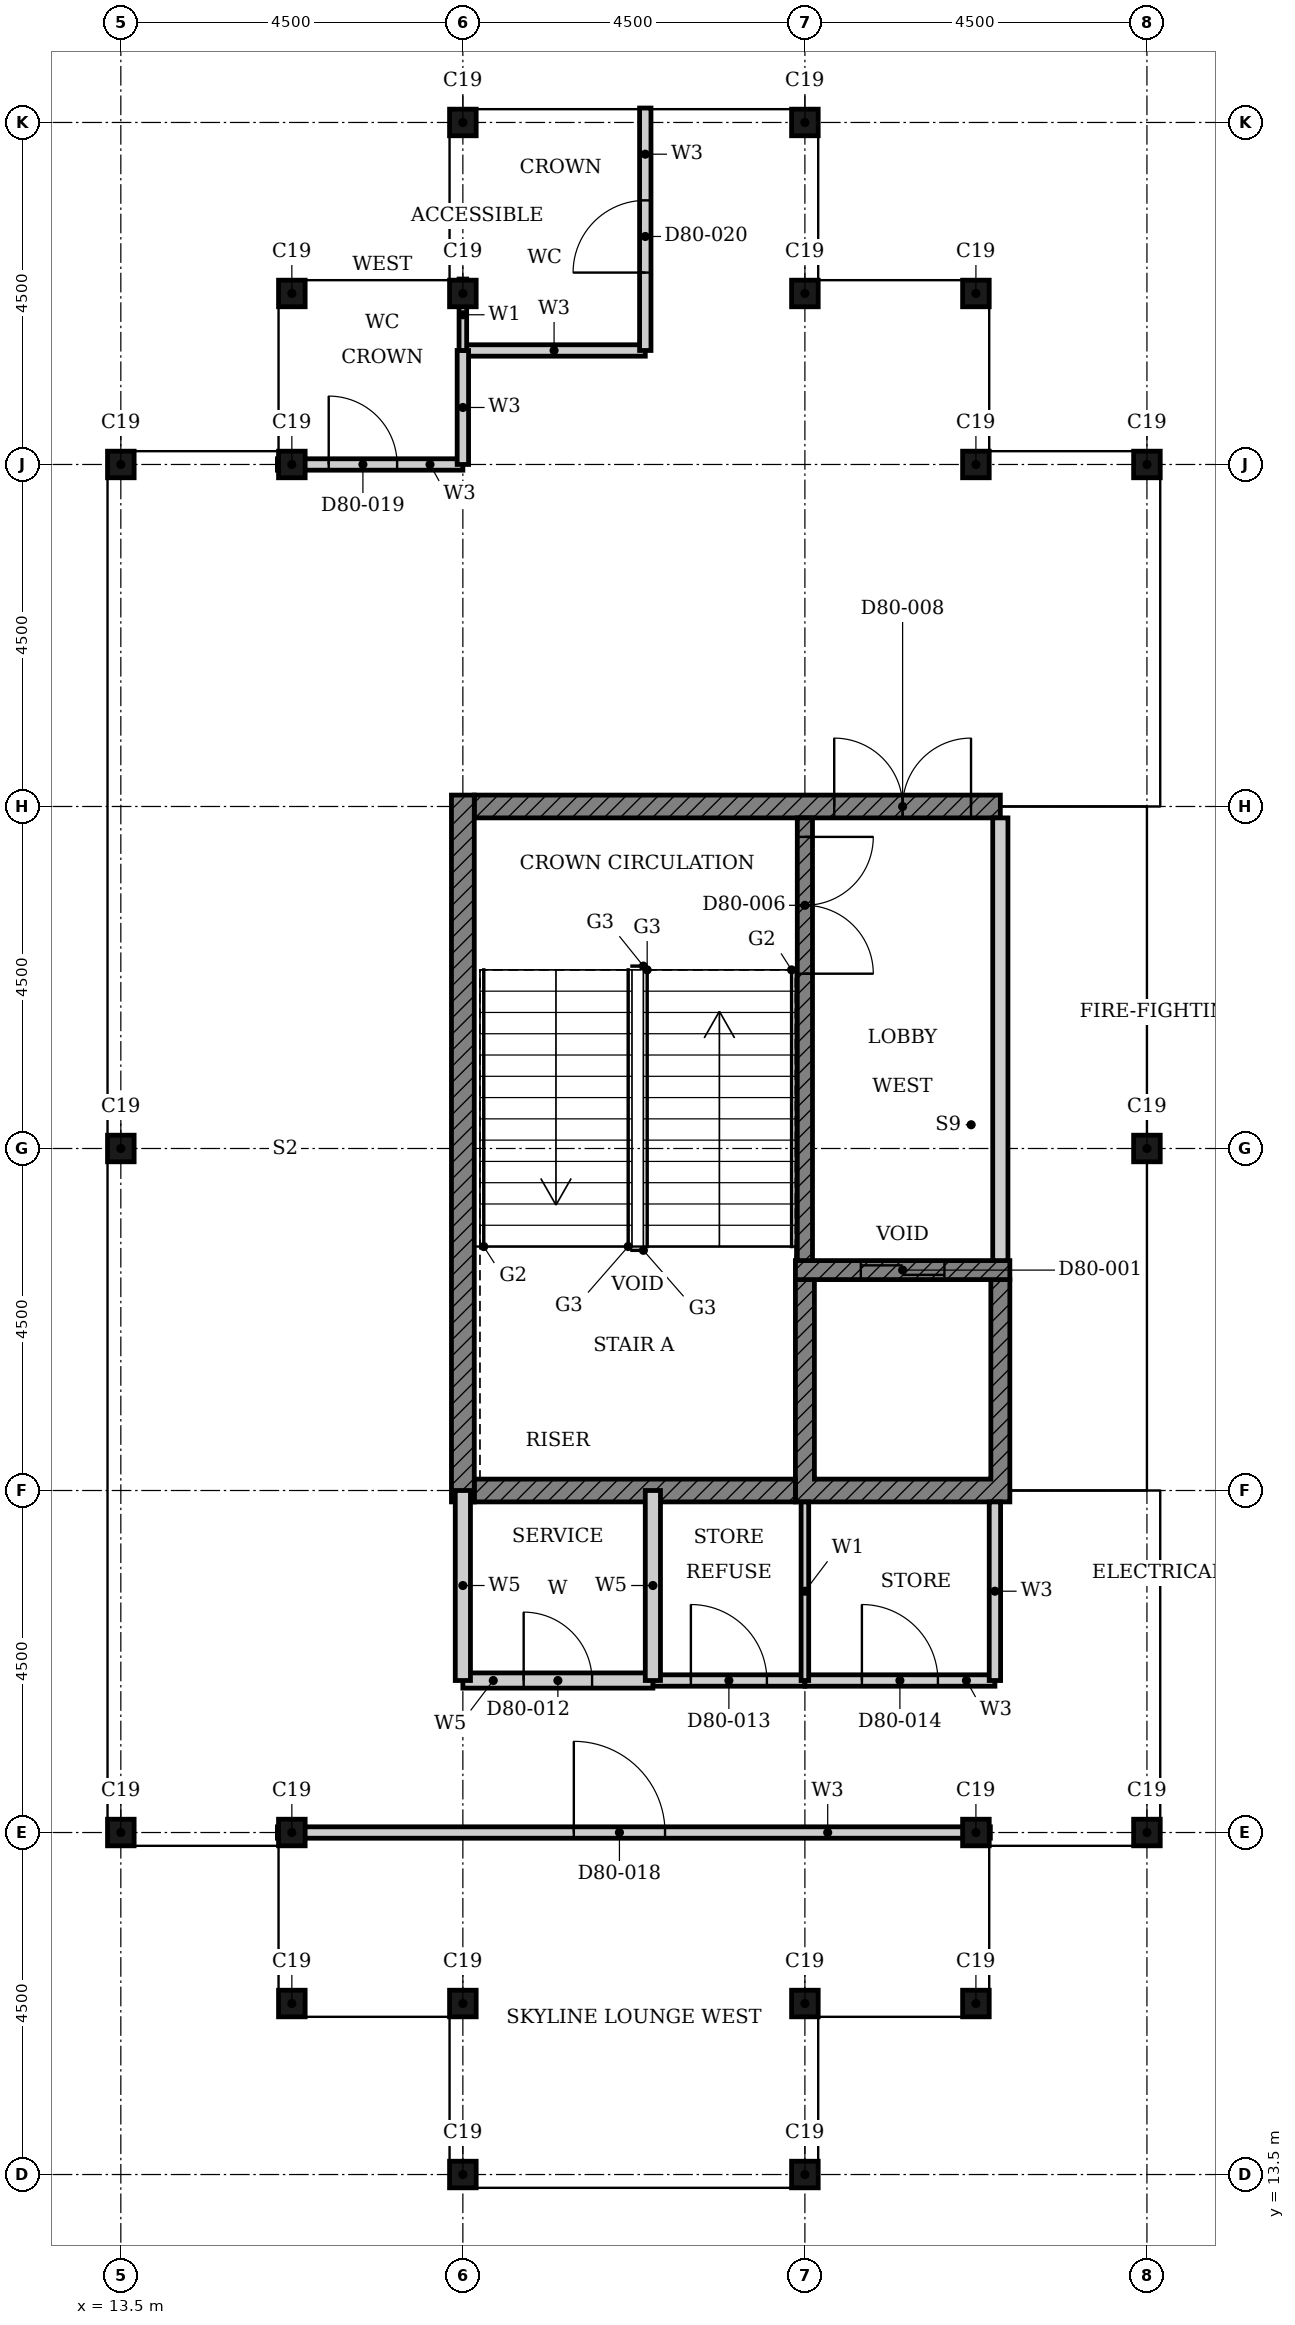
"""IFC4 building model, lengths in metres.
Left out: names, types, materials, properties, quantities, classifications, styles, units other than length and angle.
Written with IfcOpenShell. Run it as: python <this file> out.ifc"""

import sys

from ifc_helpers import new_model, si_unit, direction, frame, frame_2d, origin, origin_2d, place, context, subcontext, project, spatial, polyline, rectangle, i_section, outline, extrude, element, fill, save


model = new_model("IFC4")
c1 = context("Model", 3, precision=1e-05, world=origin(), true_north=direction((0.0, 1.0)))
c2 = subcontext(c1, "Body", "Model", "MODEL_VIEW")
j1 = project(units=[si_unit("LENGTHUNIT", "METRE"), si_unit("PLANEANGLEUNIT", "RADIAN")], contexts=[c1])
p1 = place(None, origin())
s1 = spatial("IfcSite", under=j1, at=p1, CompositionType="ELEMENT")
p2 = place(p1, origin())
s2 = spatial("IfcBuilding", under=s1, at=p2, CompositionType="ELEMENT")
p3 = place(p2, frame((0.0, 0.0, 317.0)))
s3 = spatial("IfcBuildingStorey", under=s2, at=p3, CompositionType="ELEMENT", Elevation=317.0)
for number, where, z_axis, x_axis in (
    (1, (22.5, 13.5, 0.0), (0.0, 0.0, 1.0), (1.0, 0.0, 0.0)),
    (2, (22.5, 15.75, 0.0), (0.0, 0.0, 1.0), (1.0, 0.0, 0.0)),
    (3, (24.75, 15.75, 0.0), (0.0, 0.0, 1.0), (1.0, 0.0, 0.0)),
    (4, (24.75, 18.0, 0.0), (0.0, 0.0, 1.0), (1.0, 0.0, 0.0)),
    (5, (27.0, 18.0, 0.0), (0.0, 0.0, 1.0), (1.0, 0.0, 0.0)),
    (6, (27.0, 27.0, 0.0), (0.0, 0.0, 1.0), (1.0, 0.0, 0.0)),
    (7, (27.0, 36.0, 0.0), (0.0, 0.0, 1.0), (1.0, 0.0, 0.0)),
    (8, (24.75, 36.0, 0.0), (0.0, 0.0, 1.0), (1.0, 0.0, 0.0)),
    (9, (24.75, 38.25, 0.0), (0.0, 0.0, 1.0), (1.0, 0.0, 0.0)),
    (10, (22.5, 38.25, 0.0), (0.0, 0.0, 1.0), (1.0, 0.0, 0.0)),
    (11, (22.5, 40.5, 0.0), (0.0, 0.0, 1.0), (1.0, 0.0, 0.0)),
    (12, (18.0, 40.5, 0.0), (0.0, 0.0, 1.0), (1.0, 0.0, 0.0)),
    (13, (18.0, 38.25, 0.0), (0.0, 0.0, 1.0), (1.0, 0.0, 0.0)),
    (14, (15.75, 38.25, 0.0), (0.0, 0.0, 1.0), (1.0, 0.0, 0.0)),
    (15, (15.75, 36.0, 0.0), (0.0, 0.0, 1.0), (1.0, 0.0, 0.0)),
    (16, (13.5, 36.0, 0.0), (0.0, 0.0, 1.0), (1.0, 0.0, 0.0)),
    (17, (13.5, 27.0, 0.0), (0.0, 0.0, 1.0), (1.0, 0.0, 0.0)),
    (18, (13.5, 18.0, 0.0), (0.0, 0.0, 1.0), (1.0, 0.0, 0.0)),
    (19, (15.75, 18.0, 0.0), (0.0, 0.0, 1.0), (1.0, 0.0, 0.0)),
    (20, (15.75, 15.75, 0.0), (0.0, 0.0, 1.0), (1.0, 0.0, 0.0)),
    (21, (18.0, 15.75, 0.0), (0.0, 0.0, 1.0), (1.0, 0.0, 0.0)),
    (22, (18.0, 13.5, 0.0), (0.0, 0.0, 1.0), (1.0, 0.0, 0.0)),
):
    element("IfcColumn", number, at=place(p3, frame(where, z_axis=z_axis, x_axis=x_axis)), inside=s3, PredefinedType="COLUMN", context=c2, shape_type="SweptSolid", body=[
        extrude(i_section(OverallWidth=0.35, OverallDepth=0.35, WebThickness=0.012, FlangeThickness=0.019, FilletRadius=0.013, at=origin_2d()), origin(), (0.0, 0.0, 1.0), 4.2),
    ])
p4 = place(p3, origin())
e23 = element("IfcWall", 23, at=p4, inside=s3, PredefinedType="SHEAR", context=c2, shape_type="SweptSolid", body=[
    extrude(outline(polyline([(22.375, 22.35), (25.197, 22.35), (25.197, 25.275), (24.947, 25.275), (24.947, 22.65), (22.625, 22.65), (22.625, 25.275), (22.375, 25.275), (22.375, 22.35)])), origin(), (0.0, 0.0, 1.0), 3.9),
])
p5 = place(p3, frame((18.15, 22.5, 0.0), z_axis=(0.0, 0.0, 1.0), x_axis=(1.0, 0.0, 0.0)))
e24 = element("IfcWall", 24, at=p5, inside=s3, PredefinedType="SHEAR", context=c2, shape_type="SweptSolid", body=[
    extrude(rectangle(XDim=4.225, YDim=0.3, at=frame_2d((2.113, 0.0))), origin(), (0.0, 0.0, 1.0), 3.2),
])
p6 = place(p3, frame((18.15, 31.5, 0.0), z_axis=(0.0, 0.0, 1.0), x_axis=(1.0, 0.0, 0.0)))
e25 = element("IfcWall", 25, at=p6, inside=s3, PredefinedType="SHEAR", context=c2, shape_type="SweptSolid", body=[
    extrude(rectangle(XDim=6.922, YDim=0.3, at=frame_2d((3.461, 0.0))), origin(), (0.0, 0.0, 1.0), 3.2),
])
p7 = place(p6, frame((4.736, 0.0, 0.0)))
e26 = element("IfcOpeningElement", 26, at=p7, cuts=e25, PredefinedType="OPENING", context=c2, shape_type="SweptSolid", body=[
    extrude(rectangle(XDim=1.8, YDim=2.1, at=frame_2d((0.9, 1.05))), frame((0.0, 0.16, 0.0), z_axis=(0.0, -1.0, 0.0), x_axis=(1.0, 0.0, 0.0)), (0.0, 0.0, 1.0), 0.32),
])
p8 = place(p3, frame((18.0, 22.35, 0.0), z_axis=(0.0, 0.0, 1.0), x_axis=(0.0, 1.0, 0.0)))
e27 = element("IfcWall", 27, at=p8, inside=s3, PredefinedType="SHEAR", context=c2, shape_type="SweptSolid", body=[
    extrude(rectangle(XDim=9.3, YDim=0.3, at=frame_2d((4.65, 0.0))), origin(), (0.0, 0.0, 1.0), 3.9),
])
p9 = place(p3, frame((22.375, 25.4, 0.0), z_axis=(0.0, 0.0, 1.0), x_axis=(1.0, 0.0, 0.0)))
e28 = element("IfcWall", 28, at=p9, inside=s3, PredefinedType="SHEAR", context=c2, shape_type="SweptSolid", body=[
    extrude(rectangle(XDim=2.822, YDim=0.25, at=frame_2d((1.411, 0.0))), origin(), (0.0, 0.0, 1.0), 3.9),
])
p10 = place(p9, frame((0.861, 0.0, 0.0)))
e29 = element("IfcOpeningElement", 29, at=p10, cuts=e28, PredefinedType="OPENING", context=c2, shape_type="SweptSolid", body=[
    extrude(rectangle(XDim=1.1, YDim=2.1, at=frame_2d((0.55, 1.05))), frame((0.0, 0.135, 0.0), z_axis=(0.0, -1.0, 0.0), x_axis=(1.0, 0.0, 0.0)), (0.0, 0.0, 1.0), 0.27),
])
p11 = place(p3, frame((22.5, 31.35, 0.0), z_axis=(0.0, 0.0, 1.0), x_axis=(0.0, -1.0, 0.0)))
e30 = element("IfcWall", 30, at=p11, inside=s3, PredefinedType="SHEAR", context=c2, shape_type="SweptSolid", body=[
    extrude(rectangle(XDim=5.825, YDim=0.2, at=frame_2d((2.913, 0.0))), origin(), (0.0, 0.0, 1.0), 3.9),
])
p12 = place(p11, frame((0.25, 0.0, 0.0)))
e31 = element("IfcOpeningElement", 31, at=p12, cuts=e30, PredefinedType="OPENING", context=c2, shape_type="SweptSolid", body=[
    extrude(rectangle(XDim=1.8, YDim=2.1, at=frame_2d((0.9, 1.05))), frame((0.0, 0.11, 0.0), z_axis=(0.0, -1.0, 0.0), x_axis=(1.0, 0.0, 0.0)), (0.0, 0.0, 1.0), 0.22),
])
p13 = place(p3, frame((25.072, 25.525, 0.0), z_axis=(0.0, 0.0, 1.0), x_axis=(0.0, 1.0, 0.0)))
e32 = element("IfcWall", 32, at=p13, inside=s3, PredefinedType="PARTITIONING", context=c2, shape_type="SweptSolid", body=[
    extrude(rectangle(XDim=5.825, YDim=0.2, at=frame_2d((2.913, 0.0))), origin(), (0.0, 0.0, 1.0), 3.9),
])
p14 = place(p3, frame((15.56, 18.0, 0.0), z_axis=(0.0, 0.0, 1.0), x_axis=(1.0, 0.0, 0.0)))
e33 = element("IfcWall", 33, at=p14, inside=s3, PredefinedType="PARTITIONING", context=c2, shape_type="SweptSolid", body=[
    extrude(rectangle(XDim=9.38, YDim=0.15, at=frame_2d((4.69, 0.0))), origin(), (0.0, 0.0, 1.0), 3.18),
])
p15 = place(p14, frame((3.9, 0.0, 0.0)))
e34 = element("IfcOpeningElement", 34, at=p15, cuts=e33, PredefinedType="OPENING", context=c2, shape_type="SweptSolid", body=[
    extrude(rectangle(XDim=1.2, YDim=2.4, at=frame_2d((0.6, 1.2))), frame((0.0, 0.085, 0.0), z_axis=(0.0, -1.0, 0.0), x_axis=(1.0, 0.0, 0.0)), (0.0, 0.0, 1.0), 0.17),
])
p16 = place(p3, frame((20.5, 20.0, 0.0), z_axis=(0.0, 0.0, 1.0), x_axis=(1.0, 0.0, 0.0)))
e35 = element("IfcWall", 35, at=p16, inside=s3, PredefinedType="PARTITIONING", context=c2, shape_type="SweptSolid", body=[
    extrude(rectangle(XDim=2.0, YDim=0.15, at=frame_2d((1.0, 0.0))), origin(), (0.0, 0.0, 1.0), 3.9),
])
p17 = place(p16, frame((0.5, 0.0, 0.0)))
e36 = element("IfcOpeningElement", 36, at=p17, cuts=e35, PredefinedType="OPENING", context=c2, shape_type="SweptSolid", body=[
    extrude(rectangle(XDim=1.0, YDim=2.1, at=frame_2d((0.5, 1.05))), frame((0.0, 0.085, 0.0), z_axis=(0.0, -1.0, 0.0), x_axis=(1.0, 0.0, 0.0)), (0.0, 0.0, 1.0), 0.17),
])
p18 = place(p3, frame((22.5, 20.0, 0.0), z_axis=(0.0, 0.0, 1.0), x_axis=(1.0, 0.0, 0.0)))
e37 = element("IfcWall", 37, at=p18, inside=s3, PredefinedType="PARTITIONING", context=c2, shape_type="SweptSolid", body=[
    extrude(rectangle(XDim=2.5, YDim=0.15, at=frame_2d((1.25, 0.0))), origin(), (0.0, 0.0, 1.0), 3.9),
])
p19 = place(p18, frame((0.75, 0.0, 0.0)))
e38 = element("IfcOpeningElement", 38, at=p19, cuts=e37, PredefinedType="OPENING", context=c2, shape_type="SweptSolid", body=[
    extrude(rectangle(XDim=1.0, YDim=2.1, at=frame_2d((0.5, 1.05))), frame((0.0, 0.085, 0.0), z_axis=(0.0, -1.0, 0.0), x_axis=(1.0, 0.0, 0.0)), (0.0, 0.0, 1.0), 0.17),
])
p20 = place(p3, frame((15.56, 36.0, 0.0), z_axis=(0.0, 0.0, 1.0), x_axis=(1.0, 0.0, 0.0)))
e39 = element("IfcWall", 39, at=p20, inside=s3, PredefinedType="PARTITIONING", context=c2, shape_type="SweptSolid", body=[
    extrude(rectangle(XDim=2.44, YDim=0.15, at=frame_2d((1.22, 0.0))), origin(), (0.0, 0.0, 1.0), 3.18),
])
p21 = place(p20, frame((0.675, 0.0, 0.0)))
e40 = element("IfcOpeningElement", 40, at=p21, cuts=e39, PredefinedType="OPENING", context=c2, shape_type="SweptSolid", body=[
    extrude(rectangle(XDim=0.9, YDim=2.1, at=frame_2d((0.45, 1.05))), frame((0.0, 0.085, 0.0), z_axis=(0.0, -1.0, 0.0), x_axis=(1.0, 0.0, 0.0)), (0.0, 0.0, 1.0), 0.17),
])
p22 = place(p3, frame((18.0, 37.5, 0.0), z_axis=(0.0, 0.0, 1.0), x_axis=(1.0, 0.0, 0.0)))
e41 = element("IfcWall", 41, at=p22, inside=s3, PredefinedType="PARTITIONING", context=c2, shape_type="SweptSolid", body=[
    extrude(rectangle(XDim=2.4, YDim=0.15, at=frame_2d((1.2, 0.0))), origin(), (0.0, 0.0, 1.0), 3.9),
])
p23 = place(p3, frame((18.0, 36.0, 0.0), z_axis=(0.0, 0.0, 1.0), x_axis=(0.0, 1.0, 0.0)))
e42 = element("IfcWall", 42, at=p23, inside=s3, PredefinedType="PARTITIONING", context=c2, shape_type="SweptSolid", body=[
    extrude(rectangle(XDim=1.5, YDim=0.15, at=frame_2d((0.75, 0.0))), origin(), (0.0, 0.0, 1.0), 3.9),
])
p24 = place(p3, frame((20.4, 37.5, 0.0), z_axis=(0.0, 0.0, 1.0), x_axis=(0.0, 1.0, 0.0)))
e43 = element("IfcWall", 43, at=p24, inside=s3, PredefinedType="PARTITIONING", context=c2, shape_type="SweptSolid", body=[
    extrude(rectangle(XDim=3.19, YDim=0.15, at=frame_2d((1.595, 0.0))), origin(), (0.0, 0.0, 1.0), 3.9),
])
p25 = place(p24, frame((1.025, 0.0, 0.0)))
e44 = element("IfcOpeningElement", 44, at=p25, cuts=e43, PredefinedType="OPENING", context=c2, shape_type="SweptSolid", body=[
    extrude(rectangle(XDim=0.95, YDim=2.1, at=frame_2d((0.475, 1.05))), frame((0.0, 0.085, 0.0), z_axis=(0.0, -1.0, 0.0), x_axis=(1.0, 0.0, 0.0)), (0.0, 0.0, 1.0), 0.17),
])
p26 = place(p3, frame((25.0, 20.0, 0.0), z_axis=(0.0, 0.0, 1.0), x_axis=(0.0, 1.0, 0.0)))
e45 = element("IfcWall", 45, at=p26, inside=s3, PredefinedType="PARTITIONING", context=c2, shape_type="SweptSolid", body=[
    extrude(rectangle(XDim=2.35, YDim=0.15, at=frame_2d((1.175, 0.0))), origin(), (0.0, 0.0, 1.0), 3.9),
])
p27 = place(p3, frame((18.0, 37.5, 0.0), z_axis=(0.0, 0.0, 1.0), x_axis=(0.0, 1.0, 0.0)))
e46 = element("IfcWall", 46, at=p27, inside=s3, PredefinedType="PARTITIONING", context=c2, shape_type="SweptSolid", body=[
    extrude(rectangle(XDim=0.94, YDim=0.1, at=frame_2d((0.47, 0.0))), origin(), (0.0, 0.0, 1.0), 3.9),
])
p28 = place(p3, frame((22.5, 20.0, 0.0), z_axis=(0.0, 0.0, 1.0), x_axis=(0.0, 1.0, 0.0)))
e47 = element("IfcWall", 47, at=p28, inside=s3, PredefinedType="PARTITIONING", context=c2, shape_type="SweptSolid", body=[
    extrude(rectangle(XDim=2.35, YDim=0.1, at=frame_2d((1.175, 0.0))), origin(), (0.0, 0.0, 1.0), 3.9),
])
p29 = place(p3, frame((18.0, 20.0, 0.0), z_axis=(0.0, 0.0, 1.0), x_axis=(1.0, 0.0, 0.0)))
e48 = element("IfcWall", 48, at=p29, inside=s3, PredefinedType="PARTITIONING", context=c2, shape_type="SweptSolid", body=[
    extrude(rectangle(XDim=2.5, YDim=0.2, at=frame_2d((1.25, 0.0))), origin(), (0.0, 0.0, 1.0), 3.9),
])
p30 = place(p29, frame((0.8, 0.0, 0.0)))
e49 = element("IfcOpeningElement", 49, at=p30, cuts=e48, PredefinedType="OPENING", context=c2, shape_type="SweptSolid", body=[
    extrude(rectangle(XDim=0.9, YDim=2.1, at=frame_2d((0.45, 1.05))), frame((0.0, 0.11, 0.0), z_axis=(0.0, -1.0, 0.0), x_axis=(1.0, 0.0, 0.0)), (0.0, 0.0, 1.0), 0.22),
])
for number, where, z_axis, x_axis in (
    (50, (18.0, 20.0, 0.0), (0.0, 0.0, 1.0), (0.0, 1.0, 0.0)),
    (51, (20.5, 20.0, 0.0), (0.0, 0.0, 1.0), (0.0, 1.0, 0.0)),
):
    element("IfcWall", number, at=place(p3, frame(where, z_axis=z_axis, x_axis=x_axis)), inside=s3, PredefinedType="PARTITIONING", context=c2, shape_type="SweptSolid", body=[
        extrude(rectangle(XDim=2.5, YDim=0.2, at=frame_2d((1.25, 0.0))), origin(), (0.0, 0.0, 1.0), 3.9),
    ])
p31 = place(p10, origin())
e52 = element("IfcDoor", 52, at=p31, inside=s3, OperationType="DOUBLE_DOOR_SLIDING", PredefinedType="DOOR", context=c2, shape_type="SweptSolid", body=[
    extrude(rectangle(XDim=1.1, YDim=2.1, at=frame_2d((0.55, 1.05))), frame((0.0, 0.025, 0.0), z_axis=(0.0, -1.0, 0.0), x_axis=(1.0, 0.0, 0.0)), (0.0, 0.0, 1.0), 0.05),
])
fill(e29, e52)
p32 = place(p12, origin())
e53 = element("IfcDoor", 53, at=p32, inside=s3, OperationType="DOUBLE_DOOR_SINGLE_SWING", PredefinedType="DOOR", context=c2, shape_type="SweptSolid", body=[
    extrude(rectangle(XDim=1.8, YDim=2.1, at=frame_2d((0.9, 1.05))), frame((0.0, 0.025, 0.0), z_axis=(0.0, -1.0, 0.0), x_axis=(1.0, 0.0, 0.0)), (0.0, 0.0, 1.0), 0.05),
])
fill(e31, e53)
p33 = place(p7, origin())
e54 = element("IfcDoor", 54, at=p33, inside=s3, OperationType="DOUBLE_DOOR_SINGLE_SWING", PredefinedType="DOOR", context=c2, shape_type="SweptSolid", body=[
    extrude(rectangle(XDim=1.8, YDim=2.1, at=frame_2d((0.9, 1.05))), frame((0.0, 0.025, 0.0), z_axis=(0.0, -1.0, 0.0), x_axis=(1.0, 0.0, 0.0)), (0.0, 0.0, 1.0), 0.05),
])
fill(e26, e54)
p34 = place(p30, origin())
e55 = element("IfcDoor", 55, at=p34, inside=s3, OperationType="SINGLE_SWING_RIGHT", PredefinedType="DOOR", context=c2, shape_type="SweptSolid", body=[
    extrude(rectangle(XDim=0.9, YDim=2.1, at=frame_2d((0.45, 1.05))), frame((0.0, 0.025, 0.0), z_axis=(0.0, -1.0, 0.0), x_axis=(1.0, 0.0, 0.0)), (0.0, 0.0, 1.0), 0.05),
])
fill(e49, e55)
p35 = place(p17, origin())
e56 = element("IfcDoor", 56, at=p35, inside=s3, OperationType="SINGLE_SWING_LEFT", PredefinedType="DOOR", context=c2, shape_type="SweptSolid", body=[
    extrude(rectangle(XDim=1.0, YDim=2.1, at=frame_2d((0.5, 1.05))), frame((0.0, 0.025, 0.0), z_axis=(0.0, -1.0, 0.0), x_axis=(1.0, 0.0, 0.0)), (0.0, 0.0, 1.0), 0.05),
])
fill(e36, e56)
p36 = place(p19, origin())
e57 = element("IfcDoor", 57, at=p36, inside=s3, OperationType="SINGLE_SWING_RIGHT", PredefinedType="DOOR", context=c2, shape_type="SweptSolid", body=[
    extrude(rectangle(XDim=1.0, YDim=2.1, at=frame_2d((0.5, 1.05))), frame((0.0, 0.025, 0.0), z_axis=(0.0, -1.0, 0.0), x_axis=(1.0, 0.0, 0.0)), (0.0, 0.0, 1.0), 0.05),
])
fill(e38, e57)
p37 = place(p15, origin())
e58 = element("IfcDoor", 58, at=p37, inside=s3, OperationType="SINGLE_SWING_RIGHT", PredefinedType="DOOR", context=c2, shape_type="SweptSolid", body=[
    extrude(rectangle(XDim=1.2, YDim=2.4, at=frame_2d((0.6, 1.2))), frame((0.0, 0.025, 0.0), z_axis=(0.0, -1.0, 0.0), x_axis=(1.0, 0.0, 0.0)), (0.0, 0.0, 1.0), 0.05),
])
fill(e34, e58)
p38 = place(p21, origin())
e59 = element("IfcDoor", 59, at=p38, inside=s3, OperationType="SINGLE_SWING_RIGHT", PredefinedType="DOOR", context=c2, shape_type="SweptSolid", body=[
    extrude(rectangle(XDim=0.9, YDim=2.1, at=frame_2d((0.45, 1.05))), frame((0.0, 0.025, 0.0), z_axis=(0.0, -1.0, 0.0), x_axis=(1.0, 0.0, 0.0)), (0.0, 0.0, 1.0), 0.05),
])
fill(e40, e59)
p39 = place(p25, origin())
e60 = element("IfcDoor", 60, at=p39, inside=s3, OperationType="SINGLE_SWING_LEFT", PredefinedType="DOOR", context=c2, shape_type="SweptSolid", body=[
    extrude(rectangle(XDim=0.95, YDim=2.1, at=frame_2d((0.475, 1.05))), frame((0.0, 0.025, 0.0), z_axis=(0.0, -1.0, 0.0), x_axis=(1.0, 0.0, 0.0)), (0.0, 0.0, 1.0), 0.05),
])
fill(e44, e60)
save(model, sys.argv[1])
